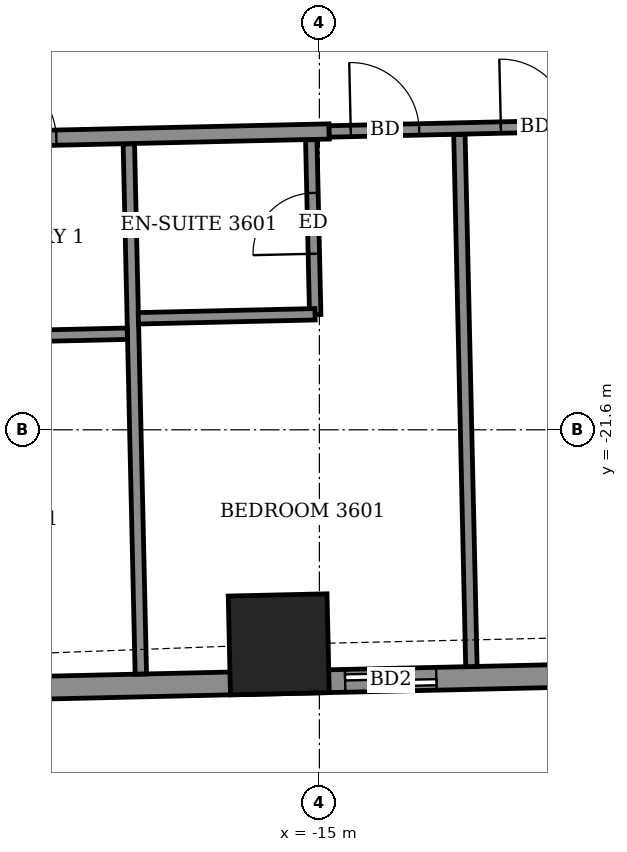
"""IFC4 building model, lengths in metres.
Left out: names, types, materials, properties, quantities, classifications, styles, units other than length and angle.
Written with IfcOpenShell. Run it as: python <this file> out.ifc"""

import sys

from ifc_helpers import new_model, si_unit, direction, frame, frame_2d, origin, origin_2d, place, context, subcontext, project, spatial, rectangle, extrude, element, fill, save


model = new_model("IFC4")
c1 = context("Model", 3, precision=1e-05, world=origin(), true_north=direction((0.0, 1.0)))
c2 = subcontext(c1, "Body", "Model", "MODEL_VIEW")
j1 = project(units=[si_unit("LENGTHUNIT", "METRE"), si_unit("PLANEANGLEUNIT", "RADIAN")], contexts=[c1])
p1 = place(None, origin())
s1 = spatial("IfcSite", under=j1, at=p1, CompositionType="ELEMENT")
p2 = place(p1, origin())
s2 = spatial("IfcBuilding", under=s1, at=p2, CompositionType="ELEMENT")
p3 = place(p2, frame((0.0, 0.0, 144.5)))
s3 = spatial("IfcBuildingStorey", under=s2, at=p3, CompositionType="ELEMENT", Elevation=144.5)
p4 = place(p3, frame((-15.535, -24.422, -0.55), z_axis=(0.0, 0.0, 1.0), x_axis=(0.999742129581, 0.022708464065, 0.0)))
e1 = element("IfcColumn", 1, at=p4, inside=s3, PredefinedType="COLUMN", context=c2, shape_type="SweptSolid", body=[
    extrude(rectangle(XDim=1.3, YDim=1.3, at=origin_2d()), origin(), (0.0, 0.0, 1.0), 3.6),
])
p5 = place(p3, frame((-22.396, -25.078, 0.0), z_axis=(0.0, 0.0, 1.0), x_axis=(0.99974279854, 0.022678993965, 0.0)))
e2 = element("IfcWall", 2, at=p5, inside=s3, PredefinedType="SOLIDWALL", context=c2, shape_type="SweptSolid", body=[
    extrude(rectangle(XDim=41.844, YDim=0.3, at=frame_2d((20.922, 0.0))), origin(), (0.0, 0.0, 1.0), 3.05),
])
p6 = place(p5, frame((2.196, 0.0, 0.0)))
e3 = element("IfcOpeningElement", 3, at=p6, cuts=e2, PredefinedType="OPENING", context=c2, shape_type="SweptSolid", body=[
    extrude(rectangle(XDim=1.5, YDim=2.4, at=frame_2d((0.75, 1.2))), frame((0.0, 0.16, 0.0), z_axis=(0.0, -1.0, 0.0), x_axis=(1.0, 0.0, 0.0)), (0.0, 0.0, 1.0), 0.32),
])
p7 = place(p5, frame((7.737, 0.0, 0.0)))
e4 = element("IfcOpeningElement", 4, at=p7, cuts=e2, PredefinedType="OPENING", context=c2, shape_type="SweptSolid", body=[
    extrude(rectangle(XDim=1.2, YDim=2.4, at=frame_2d((0.6, 1.2))), frame((0.0, 0.16, 0.0), z_axis=(0.0, -1.0, 0.0), x_axis=(1.0, 0.0, 0.0)), (0.0, 0.0, 1.0), 0.32),
])
p8 = place(p5, frame((10.699, 0.0, 0.0)))
e5 = element("IfcOpeningElement", 5, at=p8, cuts=e2, PredefinedType="OPENING", context=c2, shape_type="SweptSolid", body=[
    extrude(rectangle(XDim=1.5, YDim=2.4, at=frame_2d((0.75, 1.2))), frame((0.0, 0.16, 0.0), z_axis=(0.0, -1.0, 0.0), x_axis=(1.0, 0.0, 0.0)), (0.0, 0.0, 1.0), 0.32),
])
p9 = place(p5, frame((15.549, 0.0, 0.0)))
e6 = element("IfcOpeningElement", 6, at=p9, cuts=e2, PredefinedType="OPENING", context=c2, shape_type="SweptSolid", body=[
    extrude(rectangle(XDim=1.5, YDim=2.4, at=frame_2d((0.75, 1.2))), frame((0.0, 0.16, 0.0), z_axis=(0.0, -1.0, 0.0), x_axis=(1.0, 0.0, 0.0)), (0.0, 0.0, 1.0), 0.32),
])
p10 = place(p5, frame((18.661, 0.0, 0.0)))
e7 = element("IfcOpeningElement", 7, at=p10, cuts=e2, PredefinedType="OPENING", context=c2, shape_type="SweptSolid", body=[
    extrude(rectangle(XDim=1.5, YDim=2.4, at=frame_2d((0.75, 1.2))), frame((0.0, 0.16, 0.0), z_axis=(0.0, -1.0, 0.0), x_axis=(1.0, 0.0, 0.0)), (0.0, 0.0, 1.0), 0.32),
])
p11 = place(p5, frame((24.125, 0.0, 0.0)))
e8 = element("IfcOpeningElement", 8, at=p11, cuts=e2, PredefinedType="OPENING", context=c2, shape_type="SweptSolid", body=[
    extrude(rectangle(XDim=1.5, YDim=2.4, at=frame_2d((0.75, 1.2))), frame((0.0, 0.16, 0.0), z_axis=(0.0, -1.0, 0.0), x_axis=(1.0, 0.0, 0.0)), (0.0, 0.0, 1.0), 0.32),
])
p12 = place(p5, frame((29.298, 0.0, 0.0)))
e9 = element("IfcOpeningElement", 9, at=p12, cuts=e2, PredefinedType="OPENING", context=c2, shape_type="SweptSolid", body=[
    extrude(rectangle(XDim=1.5, YDim=2.4, at=frame_2d((0.75, 1.2))), frame((0.0, 0.16, 0.0), z_axis=(0.0, -1.0, 0.0), x_axis=(1.0, 0.0, 0.0)), (0.0, 0.0, 1.0), 0.32),
])
p13 = place(p5, frame((32.41, 0.0, 0.0)))
e10 = element("IfcOpeningElement", 10, at=p13, cuts=e2, PredefinedType="OPENING", context=c2, shape_type="SweptSolid", body=[
    extrude(rectangle(XDim=1.5, YDim=2.4, at=frame_2d((0.75, 1.2))), frame((0.0, 0.16, 0.0), z_axis=(0.0, -1.0, 0.0), x_axis=(1.0, 0.0, 0.0)), (0.0, 0.0, 1.0), 0.32),
])
p14 = place(p5, frame((37.324, 0.0, 0.9)))
e11 = element("IfcOpeningElement", 11, at=p14, cuts=e2, PredefinedType="OPENING", context=c2, shape_type="SweptSolid", body=[
    extrude(rectangle(XDim=2.4, YDim=1.5, at=frame_2d((1.2, 0.75))), frame((0.0, 0.16, 0.0), z_axis=(0.0, -1.0, 0.0), x_axis=(1.0, 0.0, 0.0)), (0.0, 0.0, 1.0), 0.32),
])
p15 = place(p3, frame((-17.349, -24.813, 0.0), z_axis=(0.0, 0.0, 1.0), x_axis=(-0.022644288452, 0.999743585226, 0.0)))
e12 = element("IfcWall", 12, at=p15, inside=s3, PredefinedType="PARTITIONING", context=c2, shape_type="SweptSolid", body=[
    extrude(rectangle(XDim=6.976, YDim=0.15, at=frame_2d((3.488, 0.0))), origin(), (0.0, 0.0, 1.0), 2.55),
])
p16 = place(p3, frame((-13.0, -24.715, 0.0), z_axis=(0.0, 0.0, 1.0), x_axis=(-0.02255982614, 0.999745494736, 0.0)))
e13 = element("IfcWall", 13, at=p16, inside=s3, PredefinedType="PARTITIONING", context=c2, shape_type="SweptSolid", body=[
    extrude(rectangle(XDim=7.002, YDim=0.15, at=frame_2d((3.501, 0.0))), origin(), (0.0, 0.0, 1.0), 2.55),
])
p17 = place(p3, frame((-20.251, -20.398, 0.0), z_axis=(0.0, 0.0, 1.0), x_axis=(0.999740955847, 0.022760079124, 0.0)))
e14 = element("IfcWall", 14, at=p17, inside=s3, PredefinedType="PARTITIONING", context=c2, shape_type="SweptSolid", body=[
    extrude(rectangle(XDim=2.725, YDim=0.15, at=frame_2d((1.362, 0.0))), origin(), (0.0, 0.0, 1.0), 3.05),
])
p18 = place(p3, frame((-15.055, -20.084, 0.0), z_axis=(0.0, 0.0, 1.0), x_axis=(-0.022612884682, 0.999744296031, 0.0)))
e15 = element("IfcWall", 15, at=p18, inside=s3, PredefinedType="PARTITIONING", context=c2, shape_type="SweptSolid", body=[
    extrude(rectangle(XDim=2.3, YDim=0.15, at=frame_2d((1.15, 0.0))), origin(), (0.0, 0.0, 1.0), 3.05),
])
p19 = place(p18, frame((0.8, 0.0, 0.0)))
e16 = element("IfcOpeningElement", 16, at=p19, cuts=e15, PredefinedType="OPENING", context=c2, shape_type="SweptSolid", body=[
    extrude(rectangle(XDim=0.8, YDim=2.1, at=frame_2d((0.4, 1.05))), frame((0.0, 0.085, 0.0), z_axis=(0.0, -1.0, 0.0), x_axis=(1.0, 0.0, 0.0)), (0.0, 0.0, 1.0), 0.17),
])
p20 = place(p3, frame((-17.382, -20.133, 0.0), z_axis=(0.0, 0.0, 1.0), x_axis=(0.99974053329, 0.022778632478, 0.0)))
e17 = element("IfcWall", 17, at=p20, inside=s3, PredefinedType="PARTITIONING", context=c2, shape_type="SweptSolid", body=[
    extrude(rectangle(XDim=2.326, YDim=0.15, at=frame_2d((1.163, 0.0))), origin(), (0.0, 0.0, 1.0), 3.05),
])
p21 = place(p3, frame((-25.709, -17.921, 0.0), z_axis=(0.0, 0.0, 1.0), x_axis=(0.999742764922, 0.022680475901, 0.0)))
e18 = element("IfcWall", 18, at=p21, inside=s3, PredefinedType="PARTITIONING", context=c2, shape_type="SweptSolid", body=[
    extrude(rectangle(XDim=10.84, YDim=0.2, at=frame_2d((5.42, 0.0))), origin(), (0.0, 0.0, 1.0), 3.05),
])
p22 = place(p21, frame((1.5, 0.0, 0.0)))
e19 = element("IfcOpeningElement", 19, at=p22, cuts=e18, PredefinedType="OPENING", context=c2, shape_type="SweptSolid", body=[
    extrude(rectangle(XDim=1.0, YDim=2.1, at=frame_2d((0.5, 1.05))), frame((0.0, 0.11, 0.0), z_axis=(0.0, -1.0, 0.0), x_axis=(1.0, 0.0, 0.0)), (0.0, 0.0, 1.0), 0.22),
])
p23 = place(p21, frame((6.35, 0.0, 0.0)))
e20 = element("IfcOpeningElement", 20, at=p23, cuts=e18, PredefinedType="OPENING", context=c2, shape_type="SweptSolid", body=[
    extrude(rectangle(XDim=0.9, YDim=2.1, at=frame_2d((0.45, 1.05))), frame((0.0, 0.11, 0.0), z_axis=(0.0, -1.0, 0.0), x_axis=(1.0, 0.0, 0.0)), (0.0, 0.0, 1.0), 0.22),
])
p24 = place(p3, frame((-14.871, -17.675, 0.0), z_axis=(0.0, 0.0, 1.0), x_axis=(0.999742359486, 0.02269834024, 0.0)))
e21 = element("IfcWall", 21, at=p24, inside=s3, PredefinedType="PARTITIONING", context=c2, shape_type="SweptSolid", body=[
    extrude(rectangle(XDim=30.536, YDim=0.15, at=frame_2d((15.268, 0.0))), origin(), (0.0, 0.0, 1.0), 3.05),
])
p25 = place(p24, frame((0.284, 0.0, 0.0)))
e22 = element("IfcOpeningElement", 22, at=p25, cuts=e21, PredefinedType="OPENING", context=c2, shape_type="SweptSolid", body=[
    extrude(rectangle(XDim=0.9, YDim=2.1, at=frame_2d((0.45, 1.05))), frame((0.0, 0.085, 0.0), z_axis=(0.0, -1.0, 0.0), x_axis=(1.0, 0.0, 0.0)), (0.0, 0.0, 1.0), 0.17),
])
p26 = place(p24, frame((2.259, 0.0, 0.0)))
e23 = element("IfcOpeningElement", 23, at=p26, cuts=e21, PredefinedType="OPENING", context=c2, shape_type="SweptSolid", body=[
    extrude(rectangle(XDim=0.9, YDim=2.1, at=frame_2d((0.45, 1.05))), frame((0.0, 0.085, 0.0), z_axis=(0.0, -1.0, 0.0), x_axis=(1.0, 0.0, 0.0)), (0.0, 0.0, 1.0), 0.17),
])
p27 = place(p24, frame((9.109, 0.0, 0.0)))
e24 = element("IfcOpeningElement", 24, at=p27, cuts=e21, PredefinedType="OPENING", context=c2, shape_type="SweptSolid", body=[
    extrude(rectangle(XDim=0.9, YDim=2.1, at=frame_2d((0.45, 1.05))), frame((0.0, 0.085, 0.0), z_axis=(0.0, -1.0, 0.0), x_axis=(1.0, 0.0, 0.0)), (0.0, 0.0, 1.0), 0.17),
])
p28 = place(p24, frame((11.109, 0.0, 0.0)))
e25 = element("IfcOpeningElement", 25, at=p28, cuts=e21, PredefinedType="OPENING", context=c2, shape_type="SweptSolid", body=[
    extrude(rectangle(XDim=0.9, YDim=2.1, at=frame_2d((0.45, 1.05))), frame((0.0, 0.085, 0.0), z_axis=(0.0, -1.0, 0.0), x_axis=(1.0, 0.0, 0.0)), (0.0, 0.0, 1.0), 0.17),
])
p29 = place(p24, frame((17.934, 0.0, 0.0)))
e26 = element("IfcOpeningElement", 26, at=p29, cuts=e21, PredefinedType="OPENING", context=c2, shape_type="SweptSolid", body=[
    extrude(rectangle(XDim=0.9, YDim=2.1, at=frame_2d((0.45, 1.05))), frame((0.0, 0.085, 0.0), z_axis=(0.0, -1.0, 0.0), x_axis=(1.0, 0.0, 0.0)), (0.0, 0.0, 1.0), 0.17),
])
p30 = place(p24, frame((20.109, 0.0, 0.0)))
e27 = element("IfcOpeningElement", 27, at=p30, cuts=e21, PredefinedType="OPENING", context=c2, shape_type="SweptSolid", body=[
    extrude(rectangle(XDim=0.9, YDim=2.1, at=frame_2d((0.45, 1.05))), frame((0.0, 0.085, 0.0), z_axis=(0.0, -1.0, 0.0), x_axis=(1.0, 0.0, 0.0)), (0.0, 0.0, 1.0), 0.17),
])
p31 = place(p24, frame((27.009, 0.0, 0.0)))
e28 = element("IfcOpeningElement", 28, at=p31, cuts=e21, PredefinedType="OPENING", context=c2, shape_type="SweptSolid", body=[
    extrude(rectangle(XDim=0.9, YDim=2.1, at=frame_2d((0.45, 1.05))), frame((0.0, 0.085, 0.0), z_axis=(0.0, -1.0, 0.0), x_axis=(1.0, 0.0, 0.0)), (0.0, 0.0, 1.0), 0.17),
])
p32 = place(p24, frame((29.209, 0.0, 0.0)))
e29 = element("IfcOpeningElement", 29, at=p32, cuts=e21, PredefinedType="OPENING", context=c2, shape_type="SweptSolid", body=[
    extrude(rectangle(XDim=0.9, YDim=2.1, at=frame_2d((0.45, 1.05))), frame((0.0, 0.085, 0.0), z_axis=(0.0, -1.0, 0.0), x_axis=(1.0, 0.0, 0.0)), (0.0, 0.0, 1.0), 0.17),
])
p33 = place(p7, origin())
e30 = element("IfcDoor", 30, at=p33, inside=s3, OperationType="SLIDING_TO_LEFT", PredefinedType="DOOR", context=c2, shape_type="SweptSolid", body=[
    extrude(rectangle(XDim=1.2, YDim=2.4, at=frame_2d((0.6, 1.2))), frame((0.0, 0.025, 0.0), z_axis=(0.0, -1.0, 0.0), x_axis=(1.0, 0.0, 0.0)), (0.0, 0.0, 1.0), 0.05),
])
fill(e4, e30)
p34 = place(p23, origin())
e31 = element("IfcDoor", 31, at=p34, inside=s3, OperationType="SINGLE_SWING_LEFT", PredefinedType="DOOR", context=c2, shape_type="SweptSolid", body=[
    extrude(rectangle(XDim=0.9, YDim=2.1, at=frame_2d((0.45, 1.05))), frame((0.0, 0.025, 0.0), z_axis=(0.0, -1.0, 0.0), x_axis=(1.0, 0.0, 0.0)), (0.0, 0.0, 1.0), 0.05),
])
fill(e20, e31)
p35 = place(p25, origin())
e32 = element("IfcDoor", 32, at=p35, inside=s3, OperationType="SINGLE_SWING_LEFT", PredefinedType="DOOR", context=c2, shape_type="SweptSolid", body=[
    extrude(rectangle(XDim=0.9, YDim=2.1, at=frame_2d((0.45, 1.05))), frame((0.0, 0.025, 0.0), z_axis=(0.0, -1.0, 0.0), x_axis=(1.0, 0.0, 0.0)), (0.0, 0.0, 1.0), 0.05),
])
fill(e22, e32)
p36 = place(p19, origin())
e33 = element("IfcDoor", 33, at=p36, inside=s3, OperationType="SINGLE_SWING_LEFT", PredefinedType="DOOR", context=c2, shape_type="SweptSolid", body=[
    extrude(rectangle(XDim=0.8, YDim=2.1, at=frame_2d((0.4, 1.05))), frame((0.0, 0.025, 0.0), z_axis=(0.0, -1.0, 0.0), x_axis=(1.0, 0.0, 0.0)), (0.0, 0.0, 1.0), 0.05),
])
fill(e16, e33)
p37 = place(p26, origin())
e34 = element("IfcDoor", 34, at=p37, inside=s3, OperationType="SINGLE_SWING_RIGHT", PredefinedType="DOOR", context=c2, shape_type="SweptSolid", body=[
    extrude(rectangle(XDim=0.9, YDim=2.1, at=frame_2d((0.45, 1.05))), frame((0.0, 0.025, 0.0), z_axis=(0.0, -1.0, 0.0), x_axis=(1.0, 0.0, 0.0)), (0.0, 0.0, 1.0), 0.05),
])
fill(e23, e34)
save(model, sys.argv[1])
